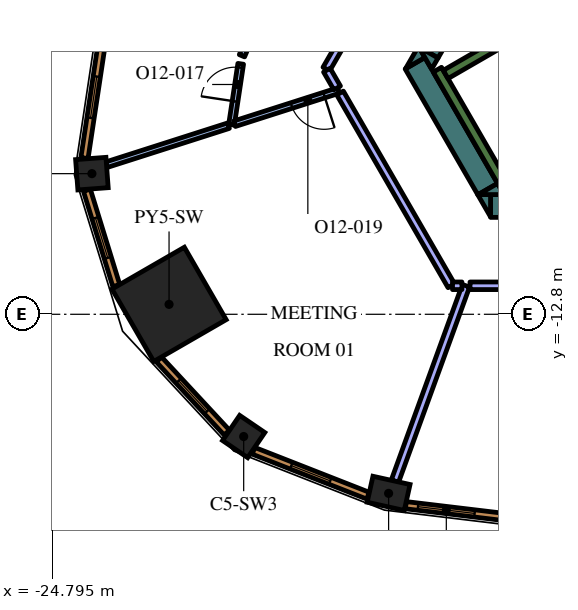
"""IFC4 building model, lengths in metres.
Left out: names, types, materials, properties, quantities, classifications, styles, units other than length and angle.
Written with IfcOpenShell. Run it as: python <this file> out.ifc"""

import sys

from ifc_helpers import new_model, si_unit, direction, frame, frame_2d, origin, origin_2d, place, context, subcontext, project, spatial, polyline, rectangle, outline, extrude, element, fill, save


model = new_model("IFC4")
c1 = context("Model", 3, precision=1e-05, world=origin(), true_north=direction((0.0, 1.0)))
c2 = subcontext(c1, "Body", "Model", "MODEL_VIEW")
j1 = project(units=[si_unit("LENGTHUNIT", "METRE"), si_unit("PLANEANGLEUNIT", "RADIAN")], contexts=[c1])
p1 = place(None, origin())
s1 = spatial("IfcSite", under=j1, at=p1, CompositionType="ELEMENT")
p2 = place(p1, origin())
s2 = spatial("IfcBuilding", under=s1, at=p2, CompositionType="ELEMENT")
p3 = place(p2, frame((0.0, 0.0, 279.6)))
s3 = spatial("IfcBuildingStorey", under=s2, at=p3, CompositionType="ELEMENT", Elevation=279.6)
p4 = place(p3, frame((-21.718, -12.539, 0.0), z_axis=(0.0, 0.0, 1.0), x_axis=(-0.866025403784, -0.5, 0.0)))
e1 = element("IfcColumn", 1, at=p4, inside=s3, PredefinedType="COLUMN", context=c2, shape_type="SweptSolid", body=[
    extrude(rectangle(XDim=2.2, YDim=2.2, at=origin_2d()), origin(), (0.0, 0.0, 1.0), 4.2),
])
p5 = place(p3, frame((-15.941, -17.512, 0.0), z_axis=(0.0, 0.0, 1.0), x_axis=(0.976233636503, -0.216720758026, 0.0)))
e2 = element("IfcColumn", 2, at=p5, inside=s3, PredefinedType="COLUMN", context=c2, shape_type="SweptSolid", body=[
    extrude(rectangle(XDim=1.0, YDim=0.7, at=origin_2d()), origin(), (0.0, 0.0, 1.0), 4.2),
])
for number, where, z_axis, x_axis in (
    (3, (-23.748, -9.1, 0.0), (0.0, 0.0, 1.0), (0.075, -0.997, 0.0)),
    (4, (-19.754, -16.017, 0.0), (0.0, 0.0, 1.0), (0.826, -0.563, 0.0)),
):
    element("IfcColumn", number, at=place(p3, frame(where, z_axis=z_axis, x_axis=x_axis)), inside=s3, PredefinedType="COLUMN", context=c2, shape_type="SweptSolid", body=[
        extrude(rectangle(XDim=0.8, YDim=0.8, at=origin_2d()), origin(), (0.0, 0.0, 1.0), 4.2),
    ])
p6 = place(p3, frame((8.904, -9.95, 0.0), z_axis=(0.0, 0.0, 1.0), x_axis=(-1.0, 0.0, 0.0)))
e5 = element("IfcWall", 5, at=p6, inside=s3, PredefinedType="SOLIDWALL", context=c2, shape_type="SweptSolid", body=[
    extrude(rectangle(XDim=22.161, YDim=0.6, at=frame_2d((11.081, 0.0))), origin(), (0.0, 0.0, 1.0), 4.2),
])
p7 = place(p3, origin())
e6 = element("IfcWall", 6, at=p7, inside=s3, PredefinedType="SOLIDWALL", context=c2, shape_type="SweptSolid", body=[
    extrude(outline(polyline([(-13.597, -9.65), (-13.259, -9.65), (-13.259, -10.236), (-13.597, -9.65)])), origin(), (0.0, 0.0, 1.0), 4.2),
])
p8 = place(p3, frame((-13.333, -9.506, 0.0), z_axis=(0.0, 0.0, 1.0), x_axis=(-0.500019073792, 0.866014391245, 0.0)))
e7 = element("IfcWall", 7, at=p8, inside=s3, PredefinedType="SOLIDWALL", context=c2, shape_type="SweptSolid", body=[
    extrude(rectangle(XDim=3.823, YDim=0.6, at=frame_2d((1.912, 0.0))), origin(), (0.0, 0.0, 1.0), 4.2),
])
e8 = element("IfcWall", 8, at=p7, inside=s3, PredefinedType="SOLIDWALL", context=c2, shape_type="SweptSolid", body=[
    extrude(outline(polyline([(-14.987, -6.043), (-15.493, -6.335), (-15.156, -5.75), (-14.987, -6.043)])), origin(), (0.0, 0.0, 1.0), 4.2),
])
e9 = element("IfcWall", 9, at=p7, inside=s3, PredefinedType="SOLIDWALL", context=c2, shape_type="SweptSolid", body=[
    extrude(outline(polyline([(-12.904, -9.65), (-13.58, -9.65), (-13.073, -9.357), (-12.904, -9.65)])), origin(), (0.0, 0.0, 1.0), 4.2),
])
p9 = place(p3, frame((-13.432, -3.364, 0.0), z_axis=(0.0, 0.0, 1.0), x_axis=(-0.499960127962, -0.866048422692, 0.0)))
e10 = element("IfcWall", 10, at=p9, inside=s3, PredefinedType="SOLIDWALL", context=c2, shape_type="SweptSolid", body=[
    extrude(rectangle(XDim=2.934, YDim=0.6, at=frame_2d((1.467, 0.0))), origin(), (0.0, 0.0, 1.0), 4.2),
])
e11 = element("IfcWall", 11, at=p7, inside=s3, PredefinedType="SOLIDWALL", context=c2, shape_type="SweptSolid", body=[
    extrude(outline(polyline([(-14.809, -6.35), (-15.147, -5.764), (-14.64, -6.057), (-14.809, -6.35)])), origin(), (0.0, 0.0, 1.0), 4.2),
])
p10 = place(p3, frame((-12.84, -9.511, 0.0), z_axis=(0.0, 0.0, 1.0), x_axis=(-0.499997733992, 0.866026712061, 0.0)))
e12 = element("IfcWall", 12, at=p10, inside=s3, PredefinedType="SOLIDWALL", context=c2, shape_type="SweptSolid", body=[
    extrude(rectangle(XDim=3.634, YDim=0.25, at=frame_2d((1.817, 0.0))), origin(), (0.0, 0.0, 1.0), 4.2),
])
p11 = place(p3, frame((-14.44, -6.49, 0.0), z_axis=(0.0, 0.0, 1.0), x_axis=(0.866022966069, 0.500004222222, 0.0)))
e13 = element("IfcWall", 13, at=p11, inside=s3, PredefinedType="SOLIDWALL", context=c2, shape_type="SweptSolid", body=[
    extrude(rectangle(XDim=6.8, YDim=0.25, at=frame_2d((3.4, 0.0))), origin(), (0.0, 0.0, 1.0), 4.2),
])
p12 = place(p3, frame((-15.774, -17.19, 0.0), z_axis=(0.0, 0.0, 1.0), x_axis=(0.341821907823, 0.93976474893, 0.0)))
e14 = element("IfcWall", 14, at=p12, inside=s3, PredefinedType="PARTITIONING", context=c2, shape_type="SweptSolid", body=[
    extrude(rectangle(XDim=5.469, YDim=0.2, at=frame_2d((2.735, 0.0))), origin(), (0.0, 0.0, 1.0), 3.55),
])
p13 = place(p3, frame((-13.799, -12.05, 0.0), z_axis=(0.0, 0.0, 1.0), x_axis=(1.0, 0.0, 0.0)))
e15 = element("IfcWall", 15, at=p13, inside=s3, PredefinedType="PARTITIONING", context=c2, shape_type="SweptSolid", body=[
    extrude(rectangle(XDim=7.303, YDim=0.2, at=frame_2d((3.652, 0.0))), origin(), (0.0, 0.0, 1.0), 3.55),
])
p14 = place(p3, frame((-19.669, -5.69, 0.0), z_axis=(0.0, 0.0, 1.0), x_axis=(-0.393566769146, -0.919296034052, 0.0)))
e16 = element("IfcWall", 16, at=p14, inside=s3, PredefinedType="PARTITIONING", context=c2, shape_type="SweptSolid", body=[
    extrude(rectangle(XDim=0.334, YDim=0.15, at=frame_2d((0.167, 0.0))), origin(), (0.0, 0.0, 1.0), 3.55),
])
p15 = place(p3, frame((-20.074, -7.812, 0.0), z_axis=(0.0, 0.0, 1.0), x_axis=(0.149305499664, 0.988791114326, 0.0)))
e17 = element("IfcWall", 17, at=p15, inside=s3, PredefinedType="PARTITIONING", context=c2, shape_type="SweptSolid", body=[
    extrude(rectangle(XDim=1.62, YDim=0.15, at=frame_2d((0.81, 0.0))), origin(), (0.0, 0.0, 1.0), 3.55),
])
p16 = place(p15, frame((0.621, 0.0, 0.0)))
e18 = element("IfcOpeningElement", 18, at=p16, cuts=e17, PredefinedType="OPENING", context=c2, shape_type="SweptSolid", body=[
    extrude(rectangle(XDim=0.9, YDim=2.1, at=frame_2d((0.45, 1.05))), frame((0.0, 0.085, 0.0), z_axis=(0.0, -1.0, 0.0), x_axis=(1.0, 0.0, 0.0)), (0.0, 0.0, 1.0), 0.17),
])
p17 = place(p3, frame((-20.154, -7.838, 0.0), z_axis=(0.0, 0.0, 1.0), x_axis=(-0.952501497002, -0.304533903217, 0.0)))
e19 = element("IfcWall", 19, at=p17, inside=s3, PredefinedType="PARTITIONING", context=c2, shape_type="SweptSolid", body=[
    extrude(rectangle(XDim=3.37, YDim=0.15, at=frame_2d((1.685, 0.0))), origin(), (0.0, 0.0, 1.0), 3.55),
])
p18 = place(p3, frame((-17.256, -6.911, 0.0), z_axis=(0.0, 0.0, 1.0), x_axis=(-0.95247639241, -0.304612412587, 0.0)))
e20 = element("IfcWall", 20, at=p18, inside=s3, PredefinedType="PARTITIONING", context=c2, shape_type="SweptSolid", body=[
    extrude(rectangle(XDim=2.875, YDim=0.15, at=frame_2d((1.438, 0.0))), origin(), (0.0, 0.0, 1.0), 3.55),
])
p19 = place(p18, frame((0.4, 0.0, 0.0)))
e21 = element("IfcOpeningElement", 21, at=p19, cuts=e20, PredefinedType="OPENING", context=c2, shape_type="SweptSolid", body=[
    extrude(rectangle(XDim=0.9, YDim=2.1, at=frame_2d((0.45, 1.05))), frame((0.0, 0.085, 0.0), z_axis=(0.0, -1.0, 0.0), x_axis=(1.0, 0.0, 0.0)), (0.0, 0.0, 1.0), 0.17),
])
p20 = place(p3, frame((-13.451, 0.803, 0.0), z_axis=(0.0, 0.0, 1.0), x_axis=(-0.499982585408, -0.86603545787, 0.0)))
e22 = element("IfcWall", 22, at=p20, inside=s3, PredefinedType="PARTITIONING", context=c2, shape_type="SweptSolid", body=[
    extrude(rectangle(XDim=8.26, YDim=0.2, at=frame_2d((4.13, 0.0))), origin(), (0.0, 0.0, 1.0), 3.55),
])
p21 = place(p3, frame((-17.565, -6.376, 0.0), z_axis=(0.0, 0.0, 1.0), x_axis=(0.499683376352, -0.866208129376, 0.0)))
e23 = element("IfcWall", 23, at=p21, inside=s3, PredefinedType="PARTITIONING", context=c2, shape_type="SweptSolid", body=[
    extrude(rectangle(XDim=0.541, YDim=0.2, at=frame_2d((0.271, 0.0))), origin(), (0.0, 0.0, 1.0), 3.55),
])
p22 = place(p3, frame((-17.218, -6.978, 0.0), z_axis=(0.0, 0.0, 1.0), x_axis=(0.500012299885, -0.866018302326, 0.0)))
e24 = element("IfcWall", 24, at=p22, inside=s3, PredefinedType="PARTITIONING", context=c2, shape_type="SweptSolid", body=[
    extrude(rectangle(XDim=5.857, YDim=0.2, at=frame_2d((2.929, 0.0))), origin(), (0.0, 0.0, 1.0), 3.55),
])
p23 = place(p3, frame((-14.26, -12.05, 0.0), z_axis=(0.0, 0.0, 1.0), x_axis=(1.0, 0.0, 0.0)))
e25 = element("IfcWall", 25, at=p23, inside=s3, PredefinedType="PARTITIONING", context=c2, shape_type="SweptSolid", body=[
    extrude(rectangle(XDim=0.248, YDim=0.2, at=frame_2d((0.124, 0.0))), origin(), (0.0, 0.0, 1.0), 3.55),
])
p24 = place(p3, frame((-15.487, -17.823, 0.0), z_axis=(0.0, 0.0, 1.0), x_axis=(0.992885582795, -0.119072328769, 0.0)))
e26 = element("IfcWall", 26, at=p24, inside=s3, PredefinedType="SOLIDWALL", context=c2, shape_type="SweptSolid", body=[
    extrude(rectangle(XDim=5.415, YDim=0.19, at=frame_2d((2.708, 0.0))), origin(), (0.0, 0.0, 1.0), 3.95),
])
p25 = place(p24, frame((0.323, 0.0, 0.6)))
e27 = element("IfcOpeningElement", 27, at=p25, cuts=e26, PredefinedType="OPENING", context=c2, shape_type="SweptSolid", body=[
    extrude(rectangle(XDim=1.5, YDim=2.85, at=frame_2d((0.75, 1.425))), frame((0.0, 0.105, 0.0), z_axis=(0.0, -1.0, 0.0), x_axis=(1.0, 0.0, 0.0)), (0.0, 0.0, 1.0), 0.21),
])
p26 = place(p24, frame((3.558, 0.0, 0.6)))
e28 = element("IfcOpeningElement", 28, at=p26, cuts=e26, PredefinedType="OPENING", context=c2, shape_type="SweptSolid", body=[
    extrude(rectangle(XDim=1.5, YDim=2.85, at=frame_2d((0.75, 1.425))), frame((0.0, 0.105, 0.0), z_axis=(0.0, -1.0, 0.0), x_axis=(1.0, 0.0, 0.0)), (0.0, 0.0, 1.0), 0.21),
])
p27 = place(p3, frame((-23.46, -5.488, 0.0), z_axis=(0.0, 0.0, 1.0), x_axis=(-0.149421055602, -0.988773658702, 0.0)))
e29 = element("IfcWall", 29, at=p27, inside=s3, PredefinedType="SOLIDWALL", context=c2, shape_type="SweptSolid", body=[
    extrude(rectangle(XDim=3.237, YDim=0.19, at=frame_2d((1.618, 0.0))), origin(), (0.0, 0.0, 1.0), 3.95),
])
p28 = place(p27, frame((1.068, 0.0, 0.6)))
e30 = element("IfcOpeningElement", 30, at=p28, cuts=e29, PredefinedType="OPENING", context=c2, shape_type="SweptSolid", body=[
    extrude(rectangle(XDim=1.1, YDim=2.85, at=frame_2d((0.55, 1.425))), frame((0.0, 0.105, 0.0), z_axis=(0.0, -1.0, 0.0), x_axis=(1.0, 0.0, 0.0)), (0.0, 0.0, 1.0), 0.21),
])
p29 = place(p3, frame((-23.881, -9.535, 0.0), z_axis=(0.0, 0.0, 1.0), x_axis=(0.294706210429, -0.9555879078, 0.0)))
e31 = element("IfcWall", 31, at=p29, inside=s3, PredefinedType="SOLIDWALL", context=c2, shape_type="SweptSolid", body=[
    extrude(rectangle(XDim=2.627, YDim=0.19, at=frame_2d((1.313, 0.0))), origin(), (0.0, 0.0, 1.0), 3.95),
])
p30 = place(p29, frame((0.763, 0.0, 0.6)))
e32 = element("IfcOpeningElement", 32, at=p30, cuts=e31, PredefinedType="OPENING", context=c2, shape_type="SweptSolid", body=[
    extrude(rectangle(XDim=1.1, YDim=2.85, at=frame_2d((0.55, 1.425))), frame((0.0, 0.105, 0.0), z_axis=(0.0, -1.0, 0.0), x_axis=(1.0, 0.0, 0.0)), (0.0, 0.0, 1.0), 0.21),
])
p31 = place(p3, frame((-21.985, -13.988, 0.0), z_axis=(0.0, 0.0, 1.0), x_axis=(0.680219354823, -0.733008614768, 0.0)))
e33 = element("IfcWall", 33, at=p31, inside=s3, PredefinedType="SOLIDWALL", context=c2, shape_type="SweptSolid", body=[
    extrude(rectangle(XDim=2.627, YDim=0.19, at=frame_2d((1.313, 0.0))), origin(), (0.0, 0.0, 1.0), 3.95),
])
p32 = place(p31, frame((0.763, 0.0, 0.6)))
e34 = element("IfcOpeningElement", 34, at=p32, cuts=e33, PredefinedType="OPENING", context=c2, shape_type="SweptSolid", body=[
    extrude(rectangle(XDim=1.1, YDim=2.85, at=frame_2d((0.55, 1.425))), frame((0.0, 0.105, 0.0), z_axis=(0.0, -1.0, 0.0), x_axis=(1.0, 0.0, 0.0)), (0.0, 0.0, 1.0), 0.21),
])
p33 = place(p3, frame((-19.496, -16.392, 0.0), z_axis=(0.0, 0.0, 1.0), x_axis=(0.93100888477, -0.364996515709, 0.0)))
e35 = element("IfcWall", 35, at=p33, inside=s3, PredefinedType="SOLIDWALL", context=c2, shape_type="SweptSolid", body=[
    extrude(rectangle(XDim=3.237, YDim=0.19, at=frame_2d((1.618, 0.0))), origin(), (0.0, 0.0, 1.0), 3.95),
])
p34 = place(p33, frame((1.068, 0.0, 0.6)))
e36 = element("IfcOpeningElement", 36, at=p34, cuts=e35, PredefinedType="OPENING", context=c2, shape_type="SweptSolid", body=[
    extrude(rectangle(XDim=1.1, YDim=2.85, at=frame_2d((0.55, 1.425))), frame((0.0, 0.105, 0.0), z_axis=(0.0, -1.0, 0.0), x_axis=(1.0, 0.0, 0.0)), (0.0, 0.0, 1.0), 0.21),
])
p35 = place(p16, origin())
e37 = element("IfcDoor", 37, at=p35, inside=s3, OperationType="SINGLE_SWING_RIGHT", PredefinedType="DOOR", context=c2, shape_type="SweptSolid", body=[
    extrude(rectangle(XDim=0.9, YDim=2.1, at=frame_2d((0.45, 1.05))), frame((0.0, 0.025, 0.0), z_axis=(0.0, -1.0, 0.0), x_axis=(1.0, 0.0, 0.0)), (0.0, 0.0, 1.0), 0.05),
])
fill(e18, e37)
p36 = place(p19, origin())
e38 = element("IfcDoor", 38, at=p36, inside=s3, OperationType="SINGLE_SWING_LEFT", PredefinedType="DOOR", context=c2, shape_type="SweptSolid", body=[
    extrude(rectangle(XDim=0.9, YDim=2.1, at=frame_2d((0.45, 1.05))), frame((0.0, 0.025, 0.0), z_axis=(0.0, -1.0, 0.0), x_axis=(1.0, 0.0, 0.0)), (0.0, 0.0, 1.0), 0.05),
])
fill(e21, e38)
p37 = place(p25, origin())
e39 = element("IfcWindow", 39, at=p37, inside=s3, PartitioningType="SINGLE_PANEL", PredefinedType="WINDOW", context=c2, shape_type="SweptSolid", body=[
    extrude(rectangle(XDim=1.5, YDim=2.85, at=frame_2d((0.75, 1.425))), frame((0.0, 0.045, 0.0), z_axis=(0.0, -1.0, 0.0), x_axis=(1.0, 0.0, 0.0)), (0.0, 0.0, 1.0), 0.06),
])
fill(e27, e39)
p38 = place(p28, origin())
e40 = element("IfcWindow", 40, at=p38, inside=s3, PartitioningType="SINGLE_PANEL", PredefinedType="WINDOW", context=c2, shape_type="SweptSolid", body=[
    extrude(rectangle(XDim=1.1, YDim=2.85, at=frame_2d((0.55, 1.425))), frame((0.0, 0.045, 0.0), z_axis=(0.0, -1.0, 0.0), x_axis=(1.0, 0.0, 0.0)), (0.0, 0.0, 1.0), 0.06),
])
fill(e30, e40)
p39 = place(p30, origin())
e41 = element("IfcWindow", 41, at=p39, inside=s3, PartitioningType="SINGLE_PANEL", PredefinedType="WINDOW", context=c2, shape_type="SweptSolid", body=[
    extrude(rectangle(XDim=1.1, YDim=2.85, at=frame_2d((0.55, 1.425))), frame((0.0, 0.045, 0.0), z_axis=(0.0, -1.0, 0.0), x_axis=(1.0, 0.0, 0.0)), (0.0, 0.0, 1.0), 0.06),
])
fill(e32, e41)
p40 = place(p32, origin())
e42 = element("IfcWindow", 42, at=p40, inside=s3, PartitioningType="SINGLE_PANEL", PredefinedType="WINDOW", context=c2, shape_type="SweptSolid", body=[
    extrude(rectangle(XDim=1.1, YDim=2.85, at=frame_2d((0.55, 1.425))), frame((0.0, 0.045, 0.0), z_axis=(0.0, -1.0, 0.0), x_axis=(1.0, 0.0, 0.0)), (0.0, 0.0, 1.0), 0.06),
])
fill(e34, e42)
p41 = place(p34, origin())
e43 = element("IfcWindow", 43, at=p41, inside=s3, PartitioningType="SINGLE_PANEL", PredefinedType="WINDOW", context=c2, shape_type="SweptSolid", body=[
    extrude(rectangle(XDim=1.1, YDim=2.85, at=frame_2d((0.55, 1.425))), frame((0.0, 0.045, 0.0), z_axis=(0.0, -1.0, 0.0), x_axis=(1.0, 0.0, 0.0)), (0.0, 0.0, 1.0), 0.06),
])
fill(e36, e43)
save(model, sys.argv[1])
